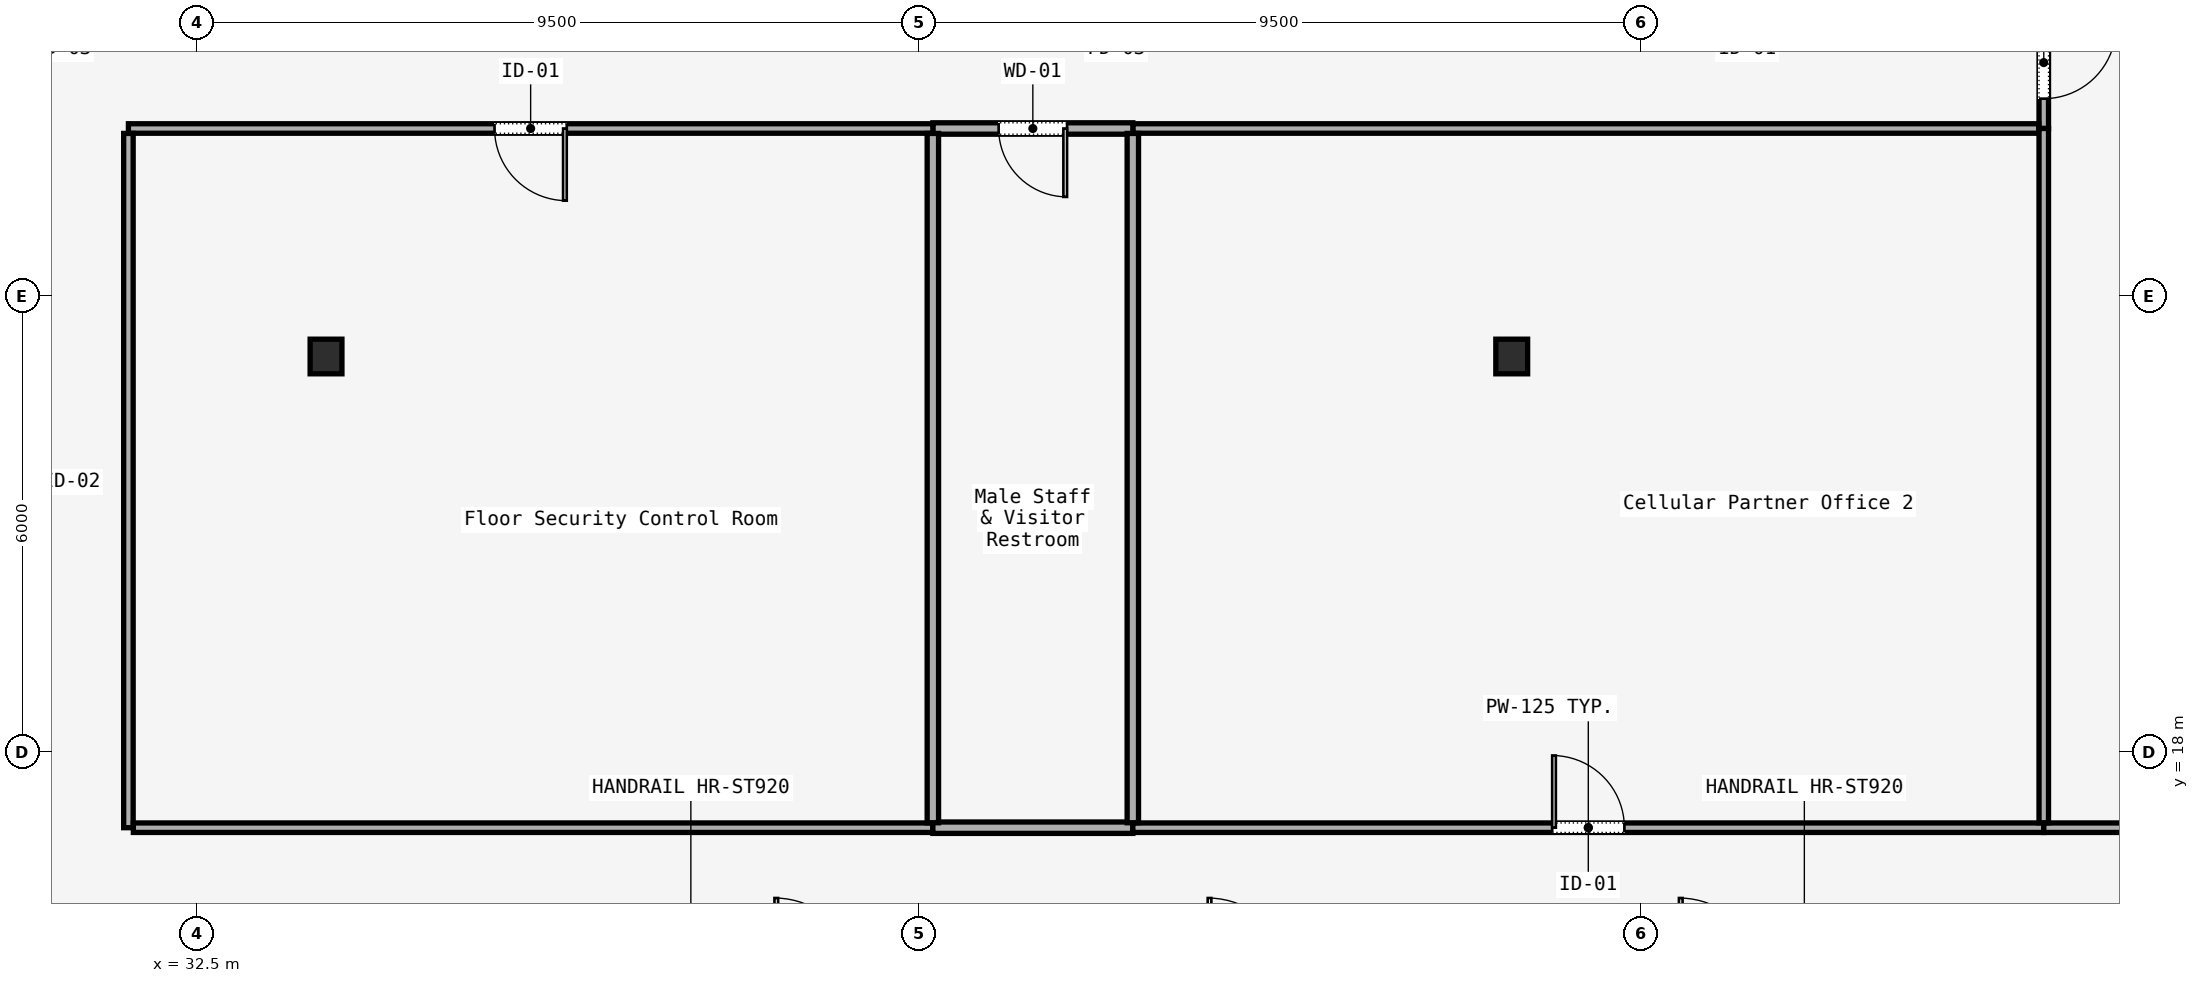
"""IFC4 building model, lengths in metres.
Left out: names, types, materials, properties, quantities, classifications, styles, units other than length and angle.
Written with IfcOpenShell. Run it as: python <this file> out.ifc"""

import sys

from ifc_helpers import new_model, si_unit, direction, frame, frame_2d, origin, origin_2d, place, context, subcontext, project, spatial, rectangle, i_section, extrude, element, fill, save


model = new_model("IFC4")
c1 = context("Model", 3, precision=1e-05, world=origin(), true_north=direction((0.0, 1.0)))
c2 = subcontext(c1, "Body", "Model", "MODEL_VIEW")
j1 = project(units=[si_unit("LENGTHUNIT", "METRE"), si_unit("PLANEANGLEUNIT", "RADIAN")], contexts=[c1])
p1 = place(None, origin())
s1 = spatial("IfcSite", under=j1, at=p1, CompositionType="ELEMENT")
p2 = place(p1, origin())
s2 = spatial("IfcBuilding", under=s1, at=p2, CompositionType="ELEMENT")
p3 = place(p2, frame((0.0, 0.0, 66.4)))
s3 = spatial("IfcBuildingStorey", under=s2, at=p3, CompositionType="ELEMENT", Elevation=66.4)
for number, where, z_axis, x_axis in (
    (1, (34.2, 23.2, 0.0), (0.0, 0.0, 1.0), (1.0, 0.0, 0.0)),
    (2, (49.8, 23.2, 0.0), (0.0, 0.0, 1.0), (1.0, 0.0, 0.0)),
):
    element("IfcColumn", number, at=place(p3, frame(where, z_axis=z_axis, x_axis=x_axis)), inside=s3, PredefinedType="COLUMN", context=c2, shape_type="SweptSolid", body=[
        extrude(i_section(OverallWidth=0.418, OverallDepth=0.456, WebThickness=0.042, FlangeThickness=0.067, FilletRadius=0.015, at=origin_2d()), origin(), (0.0, 0.0, 1.0), 3.58),
    ])
p4 = place(p3, frame((56.8, 27.935, 0.0), z_axis=(0.0, 0.0, 1.0), x_axis=(0.0, -1.0, 0.0)))
e3 = element("IfcWall", 3, at=p4, inside=s3, PredefinedType="PARTITIONING", context=c2, shape_type="SweptSolid", body=[
    extrude(rectangle(XDim=1.735, YDim=0.125, at=frame_2d((0.868, 0.0))), origin(), (0.0, 0.0, 1.0), 2.95),
])
p5 = place(p4, frame((0.393, 0.0, 0.0)))
e4 = element("IfcOpeningElement", 4, at=p5, cuts=e3, PredefinedType="OPENING", context=c2, shape_type="SweptSolid", body=[
    extrude(rectangle(XDim=0.95, YDim=2.2, at=frame_2d((0.475, 1.1))), frame((0.0, 0.062, 0.0), z_axis=(0.0, -1.0, 0.0), x_axis=(1.0, 0.0, 0.0)), (0.0, 0.0, 1.0), 0.125),
])
p6 = place(p3, frame((56.735, 26.2, 0.0), z_axis=(0.0, 0.0, 1.0), x_axis=(-1.0, 0.0, 0.0)))
e5 = element("IfcWall", 5, at=p6, inside=s3, PredefinedType="PARTITIONING", context=c2, shape_type="SweptSolid", body=[
    extrude(rectangle(XDim=11.92, YDim=0.125, at=frame_2d((5.96, 0.0))), origin(), (0.0, 0.0, 1.0), 2.95),
])
p7 = place(p3, frame((44.815, 26.2, 0.0), z_axis=(0.0, 0.0, 1.0), x_axis=(-1.0, 0.0, 0.0)))
e6 = element("IfcWall", 6, at=p7, inside=s3, PredefinedType="PARTITIONING", context=c2, shape_type="SweptSolid", body=[
    extrude(rectangle(XDim=2.631, YDim=0.15, at=frame_2d((1.315, 0.0))), origin(), (0.0, 0.0, 1.0), 2.95),
])
p8 = place(p7, frame((0.865, 0.0, 0.0)))
e7 = element("IfcOpeningElement", 7, at=p8, cuts=e6, PredefinedType="OPENING", context=c2, shape_type="SweptSolid", body=[
    extrude(rectangle(XDim=0.9, YDim=2.15, at=frame_2d((0.45, 1.075))), frame((0.0, 0.075, 0.0), z_axis=(0.0, -1.0, 0.0), x_axis=(1.0, 0.0, 0.0)), (0.0, 0.0, 1.0), 0.15),
])
p9 = place(p3, frame((42.184, 26.2, 0.0), z_axis=(0.0, 0.0, 1.0), x_axis=(-1.0, 0.0, 0.0)))
e8 = element("IfcWall", 8, at=p9, inside=s3, PredefinedType="PARTITIONING", context=c2, shape_type="SweptSolid", body=[
    extrude(rectangle(XDim=10.584, YDim=0.125, at=frame_2d((5.292, 0.0))), origin(), (0.0, 0.0, 1.0), 2.95),
])
p10 = place(p9, frame((4.817, 0.0, 0.0)))
e9 = element("IfcOpeningElement", 9, at=p10, cuts=e8, PredefinedType="OPENING", context=c2, shape_type="SweptSolid", body=[
    extrude(rectangle(XDim=0.95, YDim=2.2, at=frame_2d((0.475, 1.1))), frame((0.0, 0.062, 0.0), z_axis=(0.0, -1.0, 0.0), x_axis=(1.0, 0.0, 0.0)), (0.0, 0.0, 1.0), 0.125),
])
p11 = place(p3, frame((31.6, 26.135, 0.0), z_axis=(0.0, 0.0, 1.0), x_axis=(0.0, -1.0, 0.0)))
e10 = element("IfcWall", 10, at=p11, inside=s3, PredefinedType="PARTITIONING", context=c2, shape_type="SweptSolid", body=[
    extrude(rectangle(XDim=9.135, YDim=0.125, at=frame_2d((4.567, 0.0))), origin(), (0.0, 0.0, 1.0), 2.95),
])
p12 = place(p3, frame((31.665, 17.0, 0.0), z_axis=(0.0, 0.0, 1.0), x_axis=(1.0, 0.0, 0.0)))
e11 = element("IfcWall", 11, at=p12, inside=s3, PredefinedType="PARTITIONING", context=c2, shape_type="SweptSolid", body=[
    extrude(rectangle(XDim=10.519, YDim=0.125, at=frame_2d((5.26, 0.0))), origin(), (0.0, 0.0, 1.0), 2.95),
])
p13 = place(p3, frame((42.184, 17.0, 0.0), z_axis=(0.0, 0.0, 1.0), x_axis=(1.0, 0.0, 0.0)))
e12 = element("IfcWall", 12, at=p13, inside=s3, PredefinedType="PARTITIONING", context=c2, shape_type="SweptSolid", body=[
    extrude(rectangle(XDim=2.631, YDim=0.15, at=frame_2d((1.315, 0.0))), origin(), (0.0, 0.0, 1.0), 2.95),
])
p14 = place(p3, frame((44.815, 17.0, 0.0), z_axis=(0.0, 0.0, 1.0), x_axis=(1.0, 0.0, 0.0)))
e13 = element("IfcWall", 13, at=p14, inside=s3, PredefinedType="PARTITIONING", context=c2, shape_type="SweptSolid", body=[
    extrude(rectangle(XDim=11.985, YDim=0.125, at=frame_2d((5.993, 0.0))), origin(), (0.0, 0.0, 1.0), 2.95),
])
p15 = place(p14, frame((5.518, 0.0, 0.0)))
e14 = element("IfcOpeningElement", 14, at=p15, cuts=e13, PredefinedType="OPENING", context=c2, shape_type="SweptSolid", body=[
    extrude(rectangle(XDim=0.95, YDim=2.2, at=frame_2d((0.475, 1.1))), frame((0.0, 0.062, 0.0), z_axis=(0.0, -1.0, 0.0), x_axis=(1.0, 0.0, 0.0)), (0.0, 0.0, 1.0), 0.125),
])
p16 = place(p3, frame((56.8, 17.0, 0.0), z_axis=(0.0, 0.0, 1.0), x_axis=(1.0, 0.0, 0.0)))
e15 = element("IfcWall", 15, at=p16, inside=s3, PredefinedType="PARTITIONING", context=c2, shape_type="SweptSolid", body=[
    extrude(rectangle(XDim=1.535, YDim=0.125, at=frame_2d((0.768, 0.0))), origin(), (0.0, 0.0, 1.0), 2.95),
])
for number, where, z_axis, x_axis in (
    (16, (42.184, 26.135, 0.0), (0.0, 0.0, 1.0), (0.0, -1.0, 0.0)),
    (17, (44.815, 26.135, 0.0), (0.0, 0.0, 1.0), (0.0, -1.0, 0.0)),
):
    element("IfcWall", number, at=place(p3, frame(where, z_axis=z_axis, x_axis=x_axis)), inside=s3, PredefinedType="PARTITIONING", context=c2, shape_type="SweptSolid", body=[
        extrude(rectangle(XDim=9.07, YDim=0.15, at=frame_2d((4.535, 0.0))), origin(), (0.0, 0.0, 1.0), 2.95),
    ])
p17 = place(p3, frame((56.8, 26.2, 0.0), z_axis=(0.0, 0.0, 1.0), x_axis=(0.0, -1.0, 0.0)))
e18 = element("IfcWall", 18, at=p17, inside=s3, PredefinedType="PARTITIONING", context=c2, shape_type="SweptSolid", body=[
    extrude(rectangle(XDim=9.135, YDim=0.125, at=frame_2d((4.567, 0.0))), origin(), (0.0, 0.0, 1.0), 2.95),
])
p18 = place(p10, origin())
e19 = element("IfcDoor", 19, at=p18, inside=s3, OperationType="SINGLE_SWING_RIGHT", PredefinedType="DOOR", context=c2, shape_type="SweptSolid", body=[
    extrude(rectangle(XDim=0.95, YDim=2.2, at=frame_2d((0.475, 1.1))), frame((0.0, 0.025, 0.0), z_axis=(0.0, -1.0, 0.0), x_axis=(1.0, 0.0, 0.0)), (0.0, 0.0, 1.0), 0.05),
])
fill(e9, e19)
p19 = place(p8, origin())
e20 = element("IfcDoor", 20, at=p19, inside=s3, OperationType="SINGLE_SWING_LEFT", PredefinedType="DOOR", context=c2, shape_type="SweptSolid", body=[
    extrude(rectangle(XDim=0.9, YDim=2.15, at=frame_2d((0.45, 1.075))), frame((0.0, 0.025, 0.0), z_axis=(0.0, -1.0, 0.0), x_axis=(1.0, 0.0, 0.0)), (0.0, 0.0, 1.0), 0.05),
])
fill(e7, e20)
p20 = place(p15, origin())
e21 = element("IfcDoor", 21, at=p20, inside=s3, OperationType="SINGLE_SWING_RIGHT", PredefinedType="DOOR", context=c2, shape_type="SweptSolid", body=[
    extrude(rectangle(XDim=0.95, YDim=2.2, at=frame_2d((0.475, 1.1))), frame((0.0, 0.025, 0.0), z_axis=(0.0, -1.0, 0.0), x_axis=(1.0, 0.0, 0.0)), (0.0, 0.0, 1.0), 0.05),
])
fill(e14, e21)
p21 = place(p5, origin())
e22 = element("IfcDoor", 22, at=p21, inside=s3, OperationType="SINGLE_SWING_LEFT", PredefinedType="DOOR", context=c2, shape_type="SweptSolid", body=[
    extrude(rectangle(XDim=0.95, YDim=2.2, at=frame_2d((0.475, 1.1))), frame((0.0, 0.025, 0.0), z_axis=(0.0, -1.0, 0.0), x_axis=(1.0, 0.0, 0.0)), (0.0, 0.0, 1.0), 0.05),
])
fill(e4, e22)
save(model, sys.argv[1])
